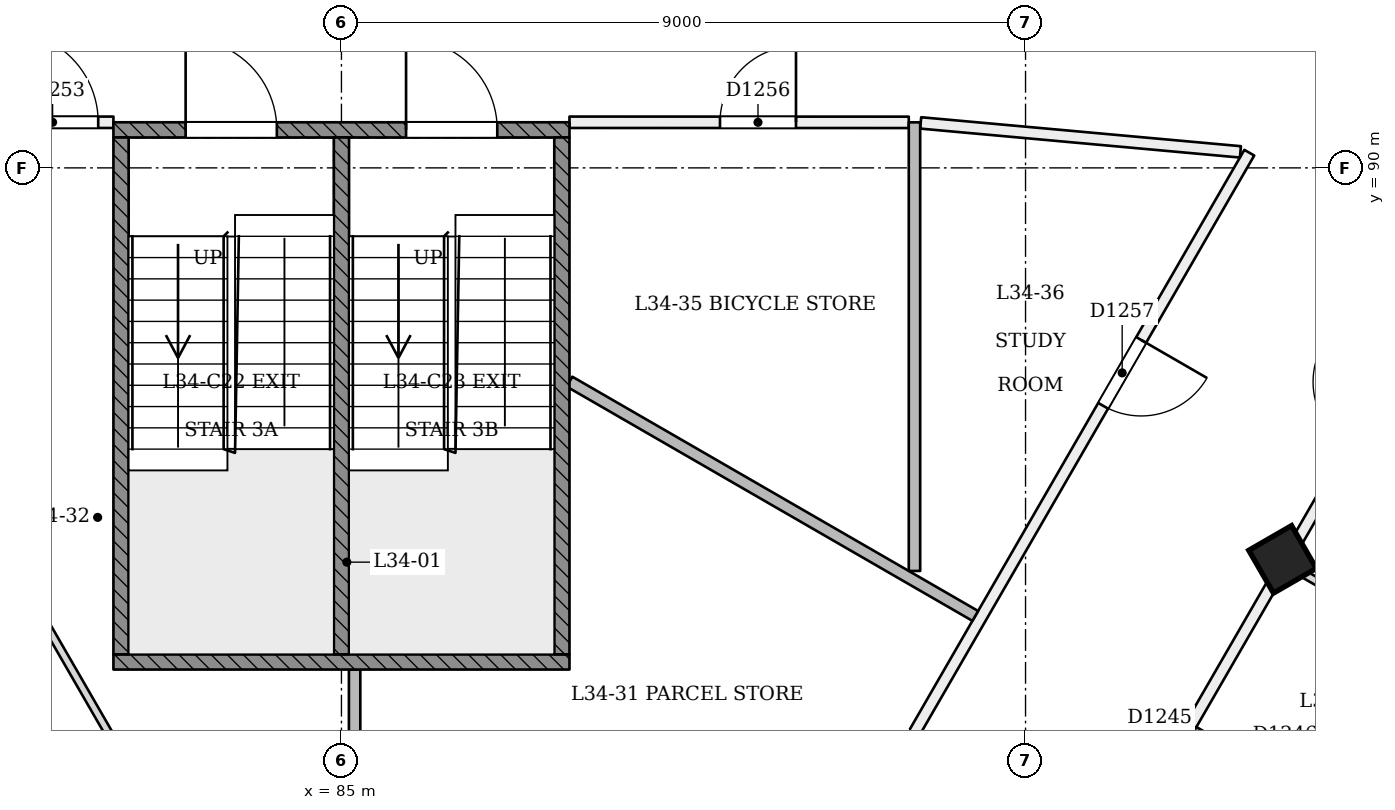
"""IFC4 building model, lengths in metres.
Left out: names, types, materials, properties, quantities, classifications, styles, units other than length and angle.
Written with IfcOpenShell. Run it as: python <this file> out.ifc"""

import sys

from ifc_helpers import new_model, si_unit, direction, frame, frame_2d, origin, origin_2d, place, context, subcontext, project, spatial, rectangle, extrude, element, fill, save


model = new_model("IFC4")
c1 = context("Model", 3, precision=1e-05, world=origin(), true_north=direction((0.0, 1.0)))
c2 = subcontext(c1, "Body", "Model", "MODEL_VIEW")
j1 = project(units=[si_unit("LENGTHUNIT", "METRE"), si_unit("PLANEANGLEUNIT", "RADIAN")], contexts=[c1])
p1 = place(None, origin())
s1 = spatial("IfcSite", under=j1, at=p1, CompositionType="ELEMENT")
p2 = place(p1, origin())
s2 = spatial("IfcBuilding", under=s1, at=p2, CompositionType="ELEMENT")
p3 = place(p2, frame((0.0, 0.0, 135.0)))
s3 = spatial("IfcBuildingStorey", under=s2, at=p3, CompositionType="ELEMENT", Elevation=135.0)
p4 = place(p3, frame((97.408, 84.803, -0.02), z_axis=(-0.02222134892, 0.038480872521, 0.999012229206), x_axis=(-0.500174592943, -0.865639497158, 0.022217955235)))
e1 = element("IfcColumn", 1, at=p4, inside=s3, PredefinedType="COLUMN", context=c2, shape_type="SweptSolid", body=[
    extrude(rectangle(XDim=0.65, YDim=0.65, at=origin_2d()), origin(), (0.0, 0.0, 1.0), 3.604),
])
p5 = place(p3, frame((96.944, 90.2, 0.0), z_axis=(0.0, 0.0, 1.0), x_axis=(-0.500002955053, -0.866023697677, 0.0)))
e2 = element("IfcWall", 2, at=p5, inside=s3, PredefinedType="PARTITIONING", context=c2, shape_type="SweptSolid", body=[
    extrude(rectangle(XDim=23.758, YDim=0.15, at=frame_2d((11.879, 0.0))), origin(), (0.0, 0.0, 1.0), 3.15),
])
p6 = place(p5, frame((18.181, 0.0, 0.0)))
e3 = element("IfcOpeningElement", 3, at=p6, cuts=e2, PredefinedType="OPENING", context=c2, shape_type="SweptSolid", body=[
    extrude(rectangle(XDim=1.0, YDim=2.1, at=frame_2d((0.5, 1.05))), frame((0.0, 0.085, 0.0), z_axis=(0.0, -1.0, 0.0), x_axis=(1.0, 0.0, 0.0)), (0.0, 0.0, 1.0), 0.171),
])
p7 = place(p5, frame((9.378, 0.0, 0.0)))
e4 = element("IfcOpeningElement", 4, at=p7, cuts=e2, PredefinedType="OPENING", context=c2, shape_type="SweptSolid", body=[
    extrude(rectangle(XDim=1.0, YDim=2.1, at=frame_2d((0.5, 1.05))), frame((0.0, 0.085, 0.0), z_axis=(0.0, -1.0, 0.0), x_axis=(1.0, 0.0, 0.0)), (0.0, 0.0, 1.0), 0.171),
])
p8 = place(p5, frame((13.859, 0.0, 0.0)))
e5 = element("IfcOpeningElement", 5, at=p8, cuts=e2, PredefinedType="OPENING", context=c2, shape_type="SweptSolid", body=[
    extrude(rectangle(XDim=1.0, YDim=2.1, at=frame_2d((0.5, 1.05))), frame((0.0, 0.085, 0.0), z_axis=(0.0, -1.0, 0.0), x_axis=(1.0, 0.0, 0.0)), (0.0, 0.0, 1.0), 0.171),
])
p9 = place(p5, frame((2.845, 0.0, 0.0)))
e6 = element("IfcOpeningElement", 6, at=p9, cuts=e2, PredefinedType="OPENING", context=c2, shape_type="SweptSolid", body=[
    extrude(rectangle(XDim=1.0, YDim=2.1, at=frame_2d((0.5, 1.05))), frame((0.0, 0.085, 0.0), z_axis=(0.0, -1.0, 0.0), x_axis=(1.0, 0.0, 0.0)), (0.0, 0.0, 1.0), 0.171),
])
p10 = place(p3, frame((64.777, 98.34, 0.0), z_axis=(0.0, 0.0, 1.0), x_axis=(0.499997513821, -0.866026839176, 0.0)))
e7 = element("IfcWall", 7, at=p10, inside=s3, PredefinedType="PARTITIONING", context=c2, shape_type="SweptSolid", body=[
    extrude(rectangle(XDim=40.26, YDim=0.15, at=frame_2d((20.13, 0.0))), origin(), (0.0, 0.0, 1.0), 2.75),
])
p11 = place(p10, frame((0.2, 0.0, 0.0)))
e8 = element("IfcOpeningElement", 8, at=p11, cuts=e7, PredefinedType="OPENING", context=c2, shape_type="SweptSolid", body=[
    extrude(rectangle(XDim=1.2, YDim=2.1, at=frame_2d((0.6, 1.05))), frame((0.0, 0.085, 0.0), z_axis=(0.0, -1.0, 0.0), x_axis=(1.0, 0.0, 0.0)), (0.0, 0.0, 1.0), 0.171),
])
p12 = place(p10, frame((9.525, 0.0, 0.0)))
e9 = element("IfcOpeningElement", 9, at=p12, cuts=e7, PredefinedType="OPENING", context=c2, shape_type="SweptSolid", body=[
    extrude(rectangle(XDim=1.0, YDim=2.1, at=frame_2d((0.5, 1.05))), frame((0.0, 0.085, 0.0), z_axis=(0.0, -1.0, 0.0), x_axis=(1.0, 0.0, 0.0)), (0.0, 0.0, 1.0), 0.171),
])
p13 = place(p10, frame((11.735, 0.0, 0.0)))
e10 = element("IfcOpeningElement", 10, at=p13, cuts=e7, PredefinedType="OPENING", context=c2, shape_type="SweptSolid", body=[
    extrude(rectangle(XDim=1.0, YDim=2.1, at=frame_2d((0.5, 1.05))), frame((0.0, 0.085, 0.0), z_axis=(0.0, -1.0, 0.0), x_axis=(1.0, 0.0, 0.0)), (0.0, 0.0, 1.0), 0.171),
])
p14 = place(p10, frame((19.53, 0.0, 0.0)))
e11 = element("IfcOpeningElement", 11, at=p14, cuts=e7, PredefinedType="OPENING", context=c2, shape_type="SweptSolid", body=[
    extrude(rectangle(XDim=1.2, YDim=2.1, at=frame_2d((0.6, 1.05))), frame((0.0, 0.085, 0.0), z_axis=(0.0, -1.0, 0.0), x_axis=(1.0, 0.0, 0.0)), (0.0, 0.0, 1.0), 0.171),
])
p15 = place(p10, frame((27.41, 0.0, 0.0)))
e12 = element("IfcOpeningElement", 12, at=p15, cuts=e7, PredefinedType="OPENING", context=c2, shape_type="SweptSolid", body=[
    extrude(rectangle(XDim=1.0, YDim=2.1, at=frame_2d((0.5, 1.05))), frame((0.0, 0.085, 0.0), z_axis=(0.0, -1.0, 0.0), x_axis=(1.0, 0.0, 0.0)), (0.0, 0.0, 1.0), 0.171),
])
p16 = place(p10, frame((34.13, 0.0, 0.0)))
e13 = element("IfcOpeningElement", 13, at=p16, cuts=e7, PredefinedType="OPENING", context=c2, shape_type="SweptSolid", body=[
    extrude(rectangle(XDim=1.2, YDim=2.1, at=frame_2d((0.6, 1.05))), frame((0.0, 0.085, 0.0), z_axis=(0.0, -1.0, 0.0), x_axis=(1.0, 0.0, 0.0)), (0.0, 0.0, 1.0), 0.171),
])
p17 = place(p10, frame((38.78, 0.0, 0.0)))
e14 = element("IfcOpeningElement", 14, at=p17, cuts=e7, PredefinedType="OPENING", context=c2, shape_type="SweptSolid", body=[
    extrude(rectangle(XDim=1.0, YDim=2.1, at=frame_2d((0.5, 1.05))), frame((0.0, 0.085, 0.0), z_axis=(0.0, -1.0, 0.0), x_axis=(1.0, 0.0, 0.0)), (0.0, 0.0, 1.0), 0.171),
])
p18 = place(p3, frame((85.093, 63.473, 0.0), z_axis=(0.0, 0.0, 1.0), x_axis=(0.499997513821, 0.866026839176, 0.0)))
e15 = element("IfcWall", 15, at=p18, inside=s3, PredefinedType="PARTITIONING", context=c2, shape_type="SweptSolid", body=[
    extrude(rectangle(XDim=40.26, YDim=0.15, at=frame_2d((20.13, 0.0))), origin(), (0.0, 0.0, 1.0), 2.75),
])
p19 = place(p18, frame((0.429, 0.0, 0.0)))
e16 = element("IfcOpeningElement", 16, at=p19, cuts=e15, PredefinedType="OPENING", context=c2, shape_type="SweptSolid", body=[
    extrude(rectangle(XDim=1.2, YDim=2.1, at=frame_2d((0.6, 1.05))), frame((0.0, 0.085, 0.0), z_axis=(0.0, -1.0, 0.0), x_axis=(1.0, 0.0, 0.0)), (0.0, 0.0, 1.0), 0.171),
])
p20 = place(p18, frame((2.85, 0.0, 0.0)))
e17 = element("IfcOpeningElement", 17, at=p20, cuts=e15, PredefinedType="OPENING", context=c2, shape_type="SweptSolid", body=[
    extrude(rectangle(XDim=1.0, YDim=2.1, at=frame_2d((0.5, 1.05))), frame((0.0, 0.085, 0.0), z_axis=(0.0, -1.0, 0.0), x_axis=(1.0, 0.0, 0.0)), (0.0, 0.0, 1.0), 0.171),
])
p21 = place(p18, frame((8.28, 0.0, 0.0)))
e18 = element("IfcOpeningElement", 18, at=p21, cuts=e15, PredefinedType="OPENING", context=c2, shape_type="SweptSolid", body=[
    extrude(rectangle(XDim=1.2, YDim=2.1, at=frame_2d((0.6, 1.05))), frame((0.0, 0.085, 0.0), z_axis=(0.0, -1.0, 0.0), x_axis=(1.0, 0.0, 0.0)), (0.0, 0.0, 1.0), 0.171),
])
p22 = place(p18, frame((11.735, 0.0, 0.0)))
e19 = element("IfcOpeningElement", 19, at=p22, cuts=e15, PredefinedType="OPENING", context=c2, shape_type="SweptSolid", body=[
    extrude(rectangle(XDim=1.0, YDim=2.1, at=frame_2d((0.5, 1.05))), frame((0.0, 0.085, 0.0), z_axis=(0.0, -1.0, 0.0), x_axis=(1.0, 0.0, 0.0)), (0.0, 0.0, 1.0), 0.171),
])
p23 = place(p18, frame((18.41, 0.0, 0.0)))
e20 = element("IfcOpeningElement", 20, at=p23, cuts=e15, PredefinedType="OPENING", context=c2, shape_type="SweptSolid", body=[
    extrude(rectangle(XDim=1.0, YDim=2.1, at=frame_2d((0.5, 1.05))), frame((0.0, 0.085, 0.0), z_axis=(0.0, -1.0, 0.0), x_axis=(1.0, 0.0, 0.0)), (0.0, 0.0, 1.0), 0.171),
])
p24 = place(p18, frame((20.85, 0.0, 0.0)))
e21 = element("IfcOpeningElement", 21, at=p24, cuts=e15, PredefinedType="OPENING", context=c2, shape_type="SweptSolid", body=[
    extrude(rectangle(XDim=1.0, YDim=2.1, at=frame_2d((0.5, 1.05))), frame((0.0, 0.085, 0.0), z_axis=(0.0, -1.0, 0.0), x_axis=(1.0, 0.0, 0.0)), (0.0, 0.0, 1.0), 0.171),
])
p25 = place(p18, frame((26.38, 0.0, 0.0)))
e22 = element("IfcOpeningElement", 22, at=p25, cuts=e15, PredefinedType="OPENING", context=c2, shape_type="SweptSolid", body=[
    extrude(rectangle(XDim=1.0, YDim=2.1, at=frame_2d((0.5, 1.05))), frame((0.0, 0.085, 0.0), z_axis=(0.0, -1.0, 0.0), x_axis=(1.0, 0.0, 0.0)), (0.0, 0.0, 1.0), 0.171),
])
p26 = place(p18, frame((34.13, 0.0, 0.0)))
e23 = element("IfcOpeningElement", 23, at=p26, cuts=e15, PredefinedType="OPENING", context=c2, shape_type="SweptSolid", body=[
    extrude(rectangle(XDim=1.2, YDim=2.1, at=frame_2d((0.6, 1.05))), frame((0.0, 0.085, 0.0), z_axis=(0.0, -1.0, 0.0), x_axis=(1.0, 0.0, 0.0)), (0.0, 0.0, 1.0), 0.171),
])
p27 = place(p18, frame((38.86, 0.0, 0.0)))
e24 = element("IfcOpeningElement", 24, at=p27, cuts=e15, PredefinedType="OPENING", context=c2, shape_type="SweptSolid", body=[
    extrude(rectangle(XDim=1.2, YDim=2.1, at=frame_2d((0.6, 1.05))), frame((0.0, 0.085, 0.0), z_axis=(0.0, -1.0, 0.0), x_axis=(1.0, 0.0, 0.0)), (0.0, 0.0, 1.0), 0.171),
])
p28 = place(p3, frame((77.529, 90.599, 0.0), z_axis=(0.0, 0.0, 1.0), x_axis=(0.999999976145, 0.000218424065, 0.0)))
e25 = element("IfcWall", 25, at=p28, inside=s3, PredefinedType="PARTITIONING", context=c2, shape_type="SweptSolid", body=[
    extrude(rectangle(XDim=4.471, YDim=0.15, at=frame_2d((2.235, 0.0))), origin(), (0.0, 0.0, 1.0), 3.15),
])
p29 = place(p28, frame((3.071, 0.0, 0.0)))
e26 = element("IfcOpeningElement", 26, at=p29, cuts=e25, PredefinedType="OPENING", context=c2, shape_type="SweptSolid", body=[
    extrude(rectangle(XDim=1.2, YDim=2.1, at=frame_2d((0.6, 1.05))), frame((0.0, 0.085, 0.0), z_axis=(0.0, -1.0, 0.0), x_axis=(1.0, 0.0, 0.0)), (0.0, 0.0, 1.0), 0.171),
])
p30 = place(p3, frame((88.0, 90.6, 0.0), z_axis=(0.0, 0.0, 1.0), x_axis=(0.99999997607, -0.000218770505, 0.0)))
e27 = element("IfcWall", 27, at=p30, inside=s3, PredefinedType="PARTITIONING", context=c2, shape_type="SweptSolid", body=[
    extrude(rectangle(XDim=4.464, YDim=0.15, at=frame_2d((2.232, 0.0))), origin(), (0.0, 0.0, 1.0), 3.15),
])
p31 = place(p30, frame((1.98, 0.0, 0.0)))
e28 = element("IfcOpeningElement", 28, at=p31, cuts=e27, PredefinedType="OPENING", context=c2, shape_type="SweptSolid", body=[
    extrude(rectangle(XDim=1.0, YDim=2.1, at=frame_2d((0.5, 1.05))), frame((0.0, 0.085, 0.0), z_axis=(0.0, -1.0, 0.0), x_axis=(1.0, 0.0, 0.0)), (0.0, 0.0, 1.0), 0.171),
])
p32 = place(p3, frame((92.621, 90.592, 0.0), z_axis=(0.0, 0.0, 1.0), x_axis=(0.995925834643, -0.09017611597, 0.0)))
e29 = element("IfcWall", 29, at=p32, inside=s3, PredefinedType="PARTITIONING", context=c2, shape_type="SweptSolid", body=[
    extrude(rectangle(XDim=4.223, YDim=0.15, at=frame_2d((2.112, 0.0))), origin(), (0.0, 0.0, 1.0), 3.15),
])
p33 = place(p3, frame((85.0, 69.513, 0.0), z_axis=(0.0, 0.0, 1.0), x_axis=(-0.500001724231, 0.866024408297, 0.0)))
e30 = element("IfcWall", 30, at=p33, inside=s3, PredefinedType="PARTITIONING", context=c2, shape_type="SweptSolid", body=[
    extrude(rectangle(XDim=23.888, YDim=0.15, at=frame_2d((11.944, 0.0))), origin(), (0.0, 0.0, 1.0), 3.15),
])
p34 = place(p33, frame((21.016, 0.0, 0.0)))
e31 = element("IfcOpeningElement", 31, at=p34, cuts=e30, PredefinedType="OPENING", context=c2, shape_type="SweptSolid", body=[
    extrude(rectangle(XDim=0.9, YDim=2.1, at=frame_2d((0.45, 1.05))), frame((0.0, 0.085, 0.0), z_axis=(0.0, -1.0, 0.0), x_axis=(1.0, 0.0, 0.0)), (0.0, 0.0, 1.0), 0.171),
])
p35 = place(p33, frame((13.865, 0.0, 0.0)))
e32 = element("IfcOpeningElement", 32, at=p35, cuts=e30, PredefinedType="OPENING", context=c2, shape_type="SweptSolid", body=[
    extrude(rectangle(XDim=0.9, YDim=2.1, at=frame_2d((0.45, 1.05))), frame((0.0, 0.085, 0.0), z_axis=(0.0, -1.0, 0.0), x_axis=(1.0, 0.0, 0.0)), (0.0, 0.0, 1.0), 0.171),
])
p36 = place(p33, frame((10.767, 0.0, 0.0)))
e33 = element("IfcOpeningElement", 33, at=p36, cuts=e30, PredefinedType="OPENING", context=c2, shape_type="SweptSolid", body=[
    extrude(rectangle(XDim=1.0, YDim=2.1, at=frame_2d((0.5, 1.05))), frame((0.0, 0.085, 0.0), z_axis=(0.0, -1.0, 0.0), x_axis=(1.0, 0.0, 0.0)), (0.0, 0.0, 1.0), 0.171),
])
p37 = place(p33, frame((5.609, 0.0, 0.0)))
e34 = element("IfcOpeningElement", 34, at=p37, cuts=e30, PredefinedType="OPENING", context=c2, shape_type="SweptSolid", body=[
    extrude(rectangle(XDim=1.0, YDim=2.1, at=frame_2d((0.5, 1.05))), frame((0.0, 0.085, 0.0), z_axis=(0.0, -1.0, 0.0), x_axis=(1.0, 0.0, 0.0)), (0.0, 0.0, 1.0), 0.171),
])
p38 = place(p33, frame((17.351, 0.0, 0.0)))
e35 = element("IfcOpeningElement", 35, at=p38, cuts=e30, PredefinedType="OPENING", context=c2, shape_type="SweptSolid", body=[
    extrude(rectangle(XDim=1.0, YDim=2.1, at=frame_2d((0.5, 1.05))), frame((0.0, 0.085, 0.0), z_axis=(0.0, -1.0, 0.0), x_axis=(1.0, 0.0, 0.0)), (0.0, 0.0, 1.0), 0.171),
])
p39 = place(p3, frame((81.969, 82.509, 0.0), z_axis=(0.0, 0.0, 1.0), x_axis=(-0.499973348067, 0.866040790738, 0.0)))
e36 = element("IfcWall", 36, at=p39, inside=s3, PredefinedType="PARTITIONING", context=c2, shape_type="SweptSolid", body=[
    extrude(rectangle(XDim=3.089, YDim=0.1, at=frame_2d((1.544, 0.0))), origin(), (0.0, 0.0, 1.0), 3.15),
])
p40 = place(p3, frame((98.669, 81.188, 0.0), z_axis=(0.0, 0.0, 1.0), x_axis=(-0.866048868473, 0.499959355765, 0.0)))
e37 = element("IfcWall", 37, at=p40, inside=s3, PredefinedType="PARTITIONING", context=c2, shape_type="SweptSolid", body=[
    extrude(rectangle(XDim=2.825, YDim=0.1, at=frame_2d((1.413, 0.0))), origin(), (0.0, 0.0, 1.0), 3.15),
])
p41 = place(p40, frame((1.0, 0.0, 0.0)))
e38 = element("IfcOpeningElement", 38, at=p41, cuts=e37, PredefinedType="OPENING", context=c2, shape_type="SweptSolid", body=[
    extrude(rectangle(XDim=0.9, YDim=2.1, at=frame_2d((0.45, 1.05))), frame((0.0, 0.061, 0.0), z_axis=(0.0, -1.0, 0.0), x_axis=(1.0, 0.0, 0.0)), (0.0, 0.0, 1.0), 0.121),
])
p42 = place(p3, frame((102.95, 81.604, 0.0), z_axis=(0.0, 0.0, 1.0), x_axis=(-0.866015887322, 0.500016482634, 0.0)))
e39 = element("IfcWall", 39, at=p42, inside=s3, PredefinedType="PARTITIONING", context=c2, shape_type="SweptSolid", body=[
    extrude(rectangle(XDim=6.325, YDim=0.1, at=frame_2d((3.163, 0.0))), origin(), (0.0, 0.0, 1.0), 2.65),
])
p43 = place(p3, frame((85.173, 83.4, 0.0), z_axis=(0.0, 0.0, 1.0), x_axis=(0.0, -1.0, 0.0)))
e40 = element("IfcWall", 40, at=p43, inside=s3, PredefinedType="PARTITIONING", context=c2, shape_type="SweptSolid", body=[
    extrude(rectangle(XDim=0.858, YDim=0.15, at=frame_2d((0.429, 0.0))), origin(), (0.0, 0.0, 1.0), 3.15),
])
p44 = place(p3, frame((93.339, 84.106, 0.0), z_axis=(0.0, 0.0, 1.0), x_axis=(-0.866024003323, 0.500002425662, 0.0)))
e41 = element("IfcWall", 41, at=p44, inside=s3, PredefinedType="PARTITIONING", context=c2, shape_type="SweptSolid", body=[
    extrude(rectangle(XDim=6.165, YDim=0.15, at=frame_2d((3.082, 0.0))), origin(), (0.0, 0.0, 1.0), 3.15),
])
p45 = place(p3, frame((92.539, 84.697, 0.0), z_axis=(0.0, 0.0, 1.0), x_axis=(0.0, 1.0, 0.0)))
e42 = element("IfcWall", 42, at=p45, inside=s3, PredefinedType="PARTITIONING", context=c2, shape_type="SweptSolid", body=[
    extrude(rectangle(XDim=5.902, YDim=0.15, at=frame_2d((2.951, 0.0))), origin(), (0.0, 0.0, 1.0), 3.15),
])
p46 = place(p3, frame((82.0, 90.5, 0.0), z_axis=(0.0, 0.0, 1.0), x_axis=(1.0, 0.0, 0.0)))
e43 = element("IfcWall", 43, at=p46, inside=s3, PredefinedType="SOLIDWALL", context=c2, shape_type="SweptSolid", body=[
    extrude(rectangle(XDim=6.0, YDim=0.2, at=frame_2d((3.0, 0.0))), origin(), (0.0, 0.0, 1.0), 3.15),
])
p47 = place(p46, frame((0.95, 0.0, 0.0)))
e44 = element("IfcOpeningElement", 44, at=p47, cuts=e43, PredefinedType="OPENING", context=c2, shape_type="SweptSolid", body=[
    extrude(rectangle(XDim=1.2, YDim=2.1, at=frame_2d((0.6, 1.05))), frame((0.0, 0.11, 0.0), z_axis=(0.0, -1.0, 0.0), x_axis=(1.0, 0.0, 0.0)), (0.0, 0.0, 1.0), 0.221),
])
p48 = place(p46, frame((3.85, 0.0, 0.0)))
e45 = element("IfcOpeningElement", 45, at=p48, cuts=e43, PredefinedType="OPENING", context=c2, shape_type="SweptSolid", body=[
    extrude(rectangle(XDim=1.2, YDim=2.1, at=frame_2d((0.6, 1.05))), frame((0.0, 0.11, 0.0), z_axis=(0.0, -1.0, 0.0), x_axis=(1.0, 0.0, 0.0)), (0.0, 0.0, 1.0), 0.221),
])
p49 = place(p3, frame((82.0, 83.5, 0.0), z_axis=(0.0, 0.0, 1.0), x_axis=(1.0, 0.0, 0.0)))
e46 = element("IfcWall", 46, at=p49, inside=s3, PredefinedType="SOLIDWALL", context=c2, shape_type="SweptSolid", body=[
    extrude(rectangle(XDim=6.0, YDim=0.2, at=frame_2d((3.0, 0.0))), origin(), (0.0, 0.0, 1.0), 3.15),
])
for number, where, z_axis, x_axis in (
    (47, (82.1, 83.6, 0.0), (0.0, 0.0, 1.0), (0.0, 1.0, 0.0)),
    (48, (87.9, 83.6, 0.0), (0.0, 0.0, 1.0), (0.0, 1.0, 0.0)),
    (49, (85.0, 83.6, 0.0), (0.0, 0.0, 1.0), (0.0, 1.0, 0.0)),
):
    element("IfcWall", number, at=place(p3, frame(where, z_axis=z_axis, x_axis=x_axis)), inside=s3, PredefinedType="SOLIDWALL", context=c2, shape_type="SweptSolid", body=[
        extrude(rectangle(XDim=6.8, YDim=0.2, at=frame_2d((3.4, 0.0))), origin(), (0.0, 0.0, 1.0), 3.15),
    ])
p50 = place(p29, origin())
e50 = element("IfcDoor", 50, at=p50, inside=s3, OperationType="SINGLE_SWING_LEFT", PredefinedType="NOTDEFINED", context=c2, shape_type="SweptSolid", body=[
    extrude(rectangle(XDim=1.2, YDim=2.1, at=frame_2d((0.6, 1.05))), frame((0.0, 0.025, 0.0), z_axis=(0.0, -1.0, 0.0), x_axis=(1.0, 0.0, 0.0)), (0.0, 0.0, 1.0), 0.05),
])
fill(e26, e50)
p51 = place(p31, origin())
e51 = element("IfcDoor", 51, at=p51, inside=s3, OperationType="SINGLE_SWING_RIGHT", PredefinedType="NOTDEFINED", context=c2, shape_type="SweptSolid", body=[
    extrude(rectangle(XDim=1.0, YDim=2.1, at=frame_2d((0.5, 1.05))), frame((0.0, 0.025, 0.0), z_axis=(0.0, -1.0, 0.0), x_axis=(1.0, 0.0, 0.0)), (0.0, 0.0, 1.0), 0.05),
])
fill(e28, e51)
p52 = place(p9, origin())
e52 = element("IfcDoor", 52, at=p52, inside=s3, OperationType="SINGLE_SWING_LEFT", PredefinedType="NOTDEFINED", context=c2, shape_type="SweptSolid", body=[
    extrude(rectangle(XDim=1.0, YDim=2.1, at=frame_2d((0.5, 1.05))), frame((0.0, 0.025, 0.0), z_axis=(0.0, -1.0, 0.0), x_axis=(1.0, 0.0, 0.0)), (0.0, 0.0, 1.0), 0.05),
])
fill(e6, e52)
p53 = place(p47, origin())
e53 = element("IfcDoor", 53, at=p53, inside=s3, OperationType="SINGLE_SWING_LEFT", PredefinedType="NOTDEFINED", context=c2, shape_type="SweptSolid", body=[
    extrude(rectangle(XDim=1.2, YDim=2.1, at=frame_2d((0.6, 1.05))), frame((0.0, 0.025, 0.0), z_axis=(0.0, -1.0, 0.0), x_axis=(1.0, 0.0, 0.0)), (0.0, 0.0, 1.0), 0.05),
])
fill(e44, e53)
p54 = place(p48, origin())
e54 = element("IfcDoor", 54, at=p54, inside=s3, OperationType="SINGLE_SWING_LEFT", PredefinedType="NOTDEFINED", context=c2, shape_type="SweptSolid", body=[
    extrude(rectangle(XDim=1.2, YDim=2.1, at=frame_2d((0.6, 1.05))), frame((0.0, 0.025, 0.0), z_axis=(0.0, -1.0, 0.0), x_axis=(1.0, 0.0, 0.0)), (0.0, 0.0, 1.0), 0.05),
])
fill(e45, e54)
save(model, sys.argv[1])
